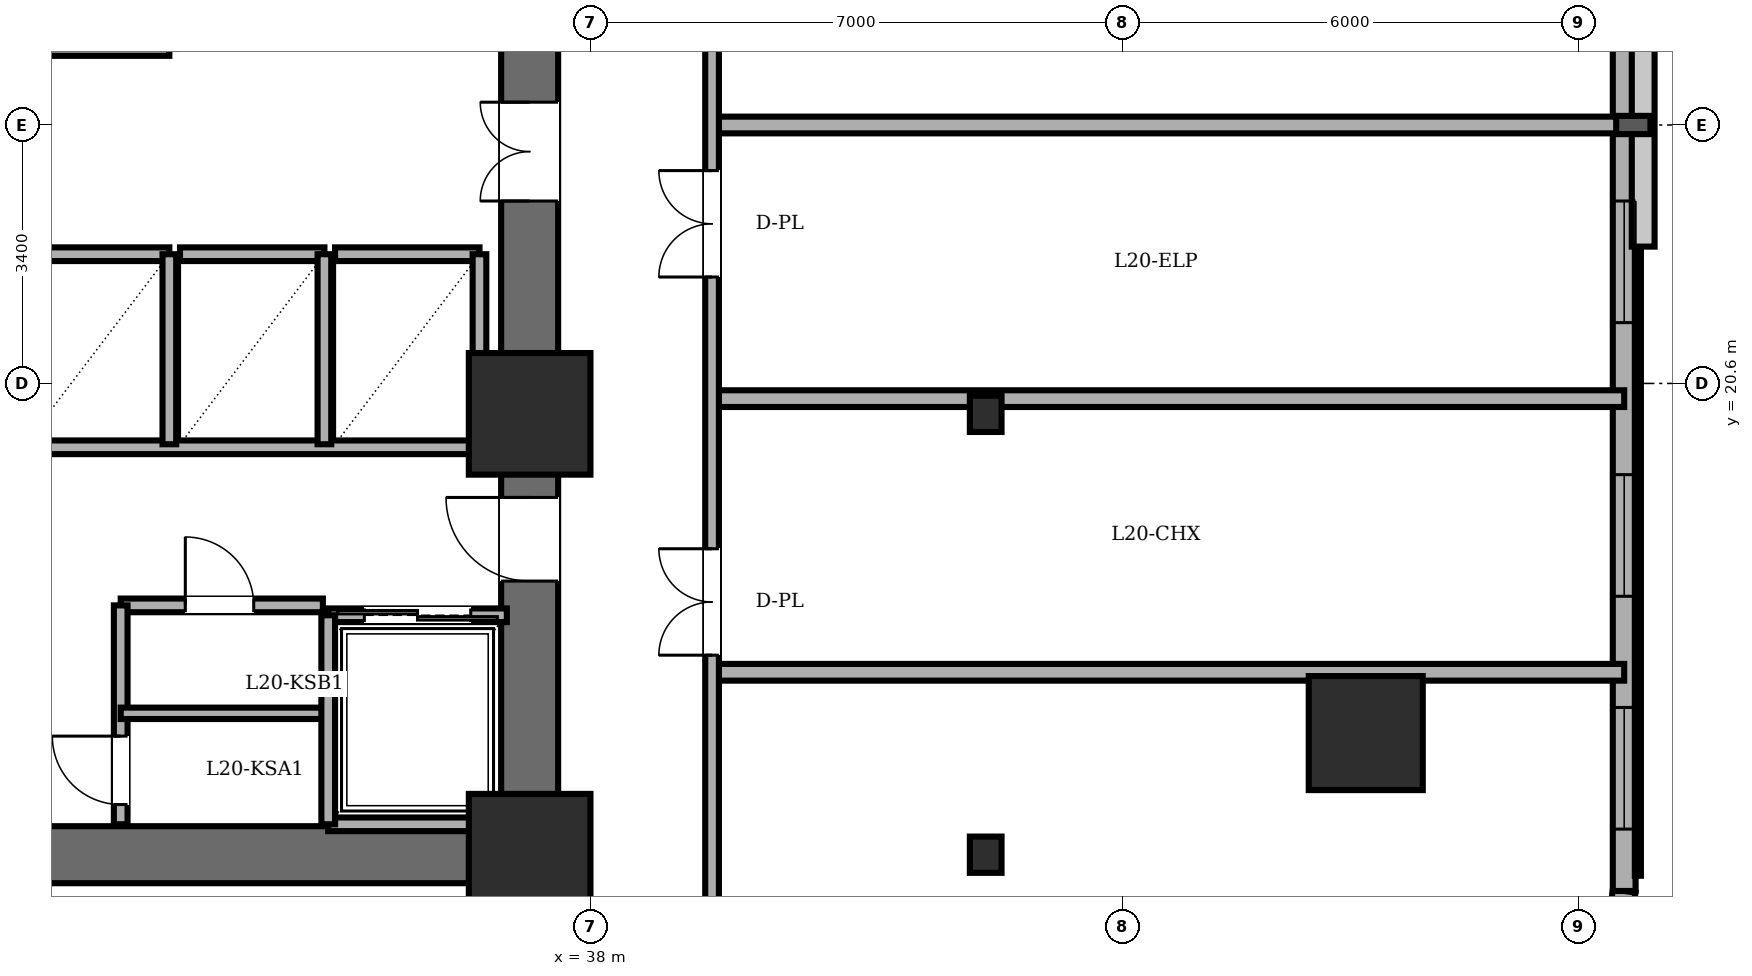
"""IFC4 building model, lengths in metres.
Left out: names, types, materials, properties, quantities, classifications, styles, units other than length and angle.
Written with IfcOpenShell. Run it as: python <this file> out.ifc"""

import sys

from ifc_helpers import new_model, si_unit, direction, frame, frame_2d, origin, origin_2d, place, context, subcontext, project, spatial, rectangle, circle, i_section, extrude, element, fill, save


model = new_model("IFC4")
c1 = context("Model", 3, precision=1e-05, world=origin(), true_north=direction((0.0, 1.0)))
c2 = subcontext(c1, "Body", "Model", "MODEL_VIEW")
j1 = project(units=[si_unit("LENGTHUNIT", "METRE"), si_unit("PLANEANGLEUNIT", "RADIAN")], contexts=[c1])
p1 = place(None, origin())
s1 = spatial("IfcSite", under=j1, at=p1, CompositionType="ELEMENT")
p2 = place(p1, origin())
s2 = spatial("IfcBuilding", under=s1, at=p2, CompositionType="ELEMENT")
p3 = place(p2, frame((0.0, 0.0, 75.6)))
s3 = spatial("IfcBuildingStorey", under=s2, at=p3, CompositionType="ELEMENT", Elevation=75.6)
for number, where, z_axis, x_axis in (
    (1, (37.2, 14.4, 0.0), (0.0, 0.0, 1.0), (1.0, 0.0, 0.0)),
    (2, (37.2, 20.2, 0.0), (0.0, 0.0, 1.0), (1.0, 0.0, 0.0)),
):
    element("IfcColumn", number, at=place(p3, frame(where, z_axis=z_axis, x_axis=x_axis)), inside=s3, PredefinedType="COLUMN", context=c2, shape_type="SweptSolid", body=[
        extrude(rectangle(XDim=1.6, YDim=1.6, at=origin_2d()), origin(), (0.0, 0.0, 1.0), 5.6),
    ])
p4 = place(p3, frame((48.2, 16.0, 0.0), z_axis=(0.0, 0.0, 1.0), x_axis=(1.0, 0.0, 0.0)))
e3 = element("IfcColumn", 3, at=p4, inside=s3, PredefinedType="COLUMN", context=c2, shape_type="SweptSolid", body=[
    extrude(circle(Radius=0.75, at=origin_2d()), origin(), (0.0, 0.0, 1.0), 2.96),
])
for number, where, z_axis, x_axis in (
    (4, (43.2, 14.4, 0.0), (0.0, 0.0, 1.0), (1.0, 0.0, 0.0)),
    (5, (43.2, 20.2, 0.0), (0.0, 0.0, 1.0), (1.0, 0.0, 0.0)),
):
    element("IfcColumn", number, at=place(p3, frame(where, z_axis=z_axis, x_axis=x_axis)), inside=s3, PredefinedType="COLUMN", context=c2, shape_type="SweptSolid", body=[
        extrude(i_section(OverallWidth=0.417, OverallDepth=0.477, WebThickness=0.036, FlangeThickness=0.057, FilletRadius=0.015, at=origin_2d()), origin(), (0.0, 0.0, 1.0), 2.96),
    ])
p5 = place(p3, frame((51.379, 12.363, 0.0), z_axis=(0.0, 0.0, 1.0), x_axis=(0.140380048512, 0.990097693149, 0.0)))
e6 = element("IfcWall", 6, at=p5, inside=s3, PredefinedType="SOLIDWALL", context=c2, shape_type="SweptSolid", body=[
    extrude(rectangle(XDim=1.576, YDim=0.3, at=frame_2d((0.788, 0.0))), origin(), (0.0, 0.0, 1.0), 5.36),
])
p6 = place(p3, frame((51.6, 13.923, 0.0), z_axis=(0.0, 0.0, 1.0), x_axis=(0.0, 1.0, 0.0)))
e7 = element("IfcWall", 7, at=p6, inside=s3, PredefinedType="SOLIDWALL", context=c2, shape_type="SweptSolid", body=[
    extrude(rectangle(XDim=20.154, YDim=0.3, at=frame_2d((10.077, 0.0))), origin(), (0.0, 0.0, 1.0), 5.36),
])
p7 = place(p6, frame((0.814, 0.0, 0.85)))
e8 = element("IfcOpeningElement", 8, at=p7, cuts=e7, PredefinedType="OPENING", context=c2, shape_type="SweptSolid", body=[
    extrude(rectangle(XDim=1.6, YDim=1.2, at=frame_2d((0.8, 0.6))), frame((0.0, 0.16, 0.0), z_axis=(0.0, -1.0, 0.0), x_axis=(1.0, 0.0, 0.0)), (0.0, 0.0, 1.0), 0.32),
])
p8 = place(p6, frame((3.877, 0.0, 0.85)))
e9 = element("IfcOpeningElement", 9, at=p8, cuts=e7, PredefinedType="OPENING", context=c2, shape_type="SweptSolid", body=[
    extrude(rectangle(XDim=1.6, YDim=1.2, at=frame_2d((0.8, 0.6))), frame((0.0, 0.16, 0.0), z_axis=(0.0, -1.0, 0.0), x_axis=(1.0, 0.0, 0.0)), (0.0, 0.0, 1.0), 0.32),
])
p9 = place(p6, frame((7.477, 0.0, 0.85)))
e10 = element("IfcOpeningElement", 10, at=p9, cuts=e7, PredefinedType="OPENING", context=c2, shape_type="SweptSolid", body=[
    extrude(rectangle(XDim=1.6, YDim=1.2, at=frame_2d((0.8, 0.6))), frame((0.0, 0.16, 0.0), z_axis=(0.0, -1.0, 0.0), x_axis=(1.0, 0.0, 0.0)), (0.0, 0.0, 1.0), 0.32),
])
p10 = place(p6, frame((12.51, 0.0, 0.85)))
e11 = element("IfcOpeningElement", 11, at=p10, cuts=e7, PredefinedType="OPENING", context=c2, shape_type="SweptSolid", body=[
    extrude(rectangle(XDim=1.6, YDim=1.2, at=frame_2d((0.8, 0.6))), frame((0.0, 0.16, 0.0), z_axis=(0.0, -1.0, 0.0), x_axis=(1.0, 0.0, 0.0)), (0.0, 0.0, 1.0), 0.32),
])
p11 = place(p6, frame((15.744, 0.0, 0.85)))
e12 = element("IfcOpeningElement", 12, at=p11, cuts=e7, PredefinedType="OPENING", context=c2, shape_type="SweptSolid", body=[
    extrude(rectangle(XDim=1.6, YDim=1.2, at=frame_2d((0.8, 0.6))), frame((0.0, 0.16, 0.0), z_axis=(0.0, -1.0, 0.0), x_axis=(1.0, 0.0, 0.0)), (0.0, 0.0, 1.0), 0.32),
])
p12 = place(p3, frame((37.2, 14.4, 0.0), z_axis=(0.0, 0.0, 1.0), x_axis=(-1.0, 0.0, 0.0)))
e13 = element("IfcWall", 13, at=p12, inside=s3, PredefinedType="SHEAR", context=c2, shape_type="SweptSolid", body=[
    extrude(rectangle(XDim=15.6, YDim=0.75, at=frame_2d((7.8, 0.0))), origin(), (0.0, 0.0, 1.0), 5.36),
])
p13 = place(p3, frame((37.2, 14.4, 0.0), z_axis=(0.0, 0.0, 1.0), x_axis=(0.0, 1.0, 0.0)))
e14 = element("IfcWall", 14, at=p13, inside=s3, PredefinedType="SHEAR", context=c2, shape_type="SweptSolid", body=[
    extrude(rectangle(XDim=19.2, YDim=0.75, at=frame_2d((9.6, 0.0))), origin(), (0.0, 0.0, 1.0), 5.36),
])
p14 = place(p13, frame((15.8, 0.0, 0.0)))
e15 = element("IfcOpeningElement", 15, at=p14, cuts=e14, PredefinedType="OPENING", context=c2, shape_type="SweptSolid", body=[
    extrude(rectangle(XDim=1.15, YDim=2.15, at=frame_2d((0.575, 1.075))), frame((0.0, 0.385, 0.0), z_axis=(0.0, -1.0, 0.0), x_axis=(1.0, 0.0, 0.0)), (0.0, 0.0, 1.0), 0.77),
])
p15 = place(p13, frame((3.6, 0.0, 0.0)))
e16 = element("IfcOpeningElement", 16, at=p15, cuts=e14, PredefinedType="OPENING", context=c2, shape_type="SweptSolid", body=[
    extrude(rectangle(XDim=1.1, YDim=2.15, at=frame_2d((0.55, 1.075))), frame((0.0, 0.385, 0.0), z_axis=(0.0, -1.0, 0.0), x_axis=(1.0, 0.0, 0.0)), (0.0, 0.0, 1.0), 0.77),
])
p16 = place(p13, frame((8.6, 0.0, 0.0)))
e17 = element("IfcOpeningElement", 17, at=p16, cuts=e14, PredefinedType="OPENING", context=c2, shape_type="SweptSolid", body=[
    extrude(rectangle(XDim=1.3, YDim=2.2, at=frame_2d((0.65, 1.1))), frame((0.0, 0.385, 0.0), z_axis=(0.0, -1.0, 0.0), x_axis=(1.0, 0.0, 0.0)), (0.0, 0.0, 1.0), 0.77),
])
p17 = place(p3, frame((21.95, 19.76, 0.0), z_axis=(0.0, 0.0, 1.0), x_axis=(1.0, 0.0, 0.0)))
e18 = element("IfcWall", 18, at=p17, inside=s3, PredefinedType="PARTITIONING", context=c2, shape_type="SweptSolid", body=[
    extrude(rectangle(XDim=14.87, YDim=0.18, at=frame_2d((7.435, 0.0))), origin(), (0.0, 0.0, 1.0), 5.36),
])
p18 = place(p3, frame((31.82, 17.68, 0.0), z_axis=(0.0, 0.0, 1.0), x_axis=(1.0, 0.0, 0.0)))
e19 = element("IfcWall", 19, at=p18, inside=s3, PredefinedType="PARTITIONING", context=c2, shape_type="SweptSolid", body=[
    extrude(rectangle(XDim=2.66, YDim=0.18, at=frame_2d((1.33, 0.0))), origin(), (0.0, 0.0, 1.0), 5.36),
])
p19 = place(p18, frame((0.85, 0.0, 0.0)))
e20 = element("IfcOpeningElement", 20, at=p19, cuts=e19, PredefinedType="OPENING", context=c2, shape_type="SweptSolid", body=[
    extrude(rectangle(XDim=0.9, YDim=2.05, at=frame_2d((0.45, 1.025))), frame((0.0, 0.1, 0.0), z_axis=(0.0, -1.0, 0.0), x_axis=(1.0, 0.0, 0.0)), (0.0, 0.0, 1.0), 0.2),
])
p20 = place(p3, frame((31.82, 14.8, 0.0), z_axis=(0.0, 0.0, 1.0), x_axis=(0.0, 1.0, 0.0)))
e21 = element("IfcWall", 21, at=p20, inside=s3, PredefinedType="PARTITIONING", context=c2, shape_type="SweptSolid", body=[
    extrude(rectangle(XDim=2.88, YDim=0.18, at=frame_2d((1.44, 0.0))), origin(), (0.0, 0.0, 1.0), 5.36),
])
p21 = place(p20, frame((0.26, 0.0, 0.0)))
e22 = element("IfcOpeningElement", 22, at=p21, cuts=e21, PredefinedType="OPENING", context=c2, shape_type="SweptSolid", body=[
    extrude(rectangle(XDim=0.9, YDim=2.05, at=frame_2d((0.45, 1.025))), frame((0.0, 0.1, 0.0), z_axis=(0.0, -1.0, 0.0), x_axis=(1.0, 0.0, 0.0)), (0.0, 0.0, 1.0), 0.2),
])
p22 = place(p3, frame((31.82, 16.26, 0.0), z_axis=(0.0, 0.0, 1.0), x_axis=(1.0, 0.0, 0.0)))
e23 = element("IfcWall", 23, at=p22, inside=s3, PredefinedType="PARTITIONING", context=c2, shape_type="SweptSolid", body=[
    extrude(rectangle(XDim=2.66, YDim=0.15, at=frame_2d((1.33, 0.0))), origin(), (0.0, 0.0, 1.0), 5.36),
])
p23 = place(p3, frame((34.55, 17.55, 0.0), z_axis=(0.0, 0.0, 1.0), x_axis=(1.0, 0.0, 0.0)))
e24 = element("IfcWall", 24, at=p23, inside=s3, PredefinedType="PARTITIONING", context=c2, shape_type="SweptSolid", body=[
    extrude(rectangle(XDim=2.35, YDim=0.18, at=frame_2d((1.175, 0.0))), origin(), (0.0, 0.0, 1.0), 5.36),
])
p24 = place(p23, frame((0.475, 0.0, 0.0)))
e25 = element("IfcOpeningElement", 25, at=p24, cuts=e24, PredefinedType="OPENING", context=c2, shape_type="SweptSolid", body=[
    extrude(rectangle(XDim=1.4, YDim=2.3, at=frame_2d((0.7, 1.15))), frame((0.0, 0.1, 0.0), z_axis=(0.0, -1.0, 0.0), x_axis=(1.0, 0.0, 0.0)), (0.0, 0.0, 1.0), 0.2),
])
p25 = place(p3, frame((36.9, 14.8, 0.0), z_axis=(0.0, 0.0, 1.0), x_axis=(-1.0, 0.0, 0.0)))
e26 = element("IfcWall", 26, at=p25, inside=s3, PredefinedType="PARTITIONING", context=c2, shape_type="SweptSolid", body=[
    extrude(rectangle(XDim=2.35, YDim=0.18, at=frame_2d((1.175, 0.0))), origin(), (0.0, 0.0, 1.0), 2.942),
])
p26 = place(p3, frame((34.55, 17.55, 0.0), z_axis=(0.0, 0.0, 1.0), x_axis=(0.0, -1.0, 0.0)))
e27 = element("IfcWall", 27, at=p26, inside=s3, PredefinedType="PARTITIONING", context=c2, shape_type="SweptSolid", body=[
    extrude(rectangle(XDim=2.75, YDim=0.18, at=frame_2d((1.375, 0.0))), origin(), (0.0, 0.0, 1.0), 5.36),
])
p27 = place(p3, frame((32.46, 25.0, 0.0), z_axis=(0.0, 0.0, 1.0), x_axis=(-1.0, 0.0, 0.0)))
e28 = element("IfcWall", 28, at=p27, inside=s3, PredefinedType="PARTITIONING", context=c2, shape_type="SweptSolid", body=[
    extrude(rectangle(XDim=1.82, YDim=0.18, at=frame_2d((0.91, 0.0))), origin(), (0.0, 0.0, 1.0), 5.36),
])
p28 = place(p3, frame((30.56, 22.3, 0.0), z_axis=(0.0, 0.0, 1.0), x_axis=(1.0, 0.0, 0.0)))
e29 = element("IfcWall", 29, at=p28, inside=s3, PredefinedType="PARTITIONING", context=c2, shape_type="SweptSolid", body=[
    extrude(rectangle(XDim=1.9, YDim=0.18, at=frame_2d((0.95, 0.0))), origin(), (0.0, 0.0, 1.0), 5.36),
])
p29 = place(p3, frame((32.46, 19.8, 0.0), z_axis=(0.0, 0.0, 1.0), x_axis=(0.0, 1.0, 0.0)))
e30 = element("IfcWall", 30, at=p29, inside=s3, PredefinedType="PARTITIONING", context=c2, shape_type="SweptSolid", body=[
    extrude(rectangle(XDim=2.5, YDim=0.18, at=frame_2d((1.25, 0.0))), origin(), (0.0, 0.0, 1.0), 5.36),
])
p30 = place(p3, frame((32.6, 22.3, 0.0), z_axis=(0.0, 0.0, 1.0), x_axis=(1.0, 0.0, 0.0)))
e31 = element("IfcWall", 31, at=p30, inside=s3, PredefinedType="PARTITIONING", context=c2, shape_type="SweptSolid", body=[
    extrude(rectangle(XDim=1.9, YDim=0.18, at=frame_2d((0.95, 0.0))), origin(), (0.0, 0.0, 1.0), 5.36),
])
p31 = place(p3, frame((34.5, 19.8, 0.0), z_axis=(0.0, 0.0, 1.0), x_axis=(0.0, 1.0, 0.0)))
e32 = element("IfcWall", 32, at=p31, inside=s3, PredefinedType="PARTITIONING", context=c2, shape_type="SweptSolid", body=[
    extrude(rectangle(XDim=2.5, YDim=0.18, at=frame_2d((1.25, 0.0))), origin(), (0.0, 0.0, 1.0), 5.36),
])
p32 = place(p3, frame((34.64, 22.3, 0.0), z_axis=(0.0, 0.0, 1.0), x_axis=(1.0, 0.0, 0.0)))
e33 = element("IfcWall", 33, at=p32, inside=s3, PredefinedType="PARTITIONING", context=c2, shape_type="SweptSolid", body=[
    extrude(rectangle(XDim=1.9, YDim=0.18, at=frame_2d((0.95, 0.0))), origin(), (0.0, 0.0, 1.0), 5.36),
])
p33 = place(p3, frame((36.54, 19.8, 0.0), z_axis=(0.0, 0.0, 1.0), x_axis=(0.0, 1.0, 0.0)))
e34 = element("IfcWall", 34, at=p33, inside=s3, PredefinedType="PARTITIONING", context=c2, shape_type="SweptSolid", body=[
    extrude(rectangle(XDim=2.5, YDim=0.18, at=frame_2d((1.25, 0.0))), origin(), (0.0, 0.0, 1.0), 5.36),
])
p34 = place(p3, frame((39.6, 16.8, 0.0), z_axis=(0.0, 0.0, 1.0), x_axis=(1.0, 0.0, 0.0)))
e35 = element("IfcWall", 35, at=p34, inside=s3, PredefinedType="PARTITIONING", context=c2, shape_type="SweptSolid", body=[
    extrude(rectangle(XDim=12.0, YDim=0.22, at=frame_2d((6.0, 0.0))), origin(), (0.0, 0.0, 1.0), 5.36),
])
p35 = place(p3, frame((39.6, 20.4, 0.0), z_axis=(0.0, 0.0, 1.0), x_axis=(1.0, 0.0, 0.0)))
e36 = element("IfcWall", 36, at=p35, inside=s3, PredefinedType="PARTITIONING", context=c2, shape_type="SweptSolid", body=[
    extrude(rectangle(XDim=12.0, YDim=0.22, at=frame_2d((6.0, 0.0))), origin(), (0.0, 0.0, 1.0), 2.942),
])
p36 = place(p3, frame((39.6, 24.0, 0.0), z_axis=(0.0, 0.0, 1.0), x_axis=(1.0, 0.0, 0.0)))
e37 = element("IfcWall", 37, at=p36, inside=s3, PredefinedType="PARTITIONING", context=c2, shape_type="SweptSolid", body=[
    extrude(rectangle(XDim=12.0, YDim=0.22, at=frame_2d((6.0, 0.0))), origin(), (0.0, 0.0, 1.0), 4.982),
])
p37 = place(p3, frame((39.6, 11.8, 0.0), z_axis=(0.0, 0.0, 1.0), x_axis=(0.0, 1.0, 0.0)))
e38 = element("IfcWall", 38, at=p37, inside=s3, PredefinedType="PARTITIONING", context=c2, shape_type="SweptSolid", body=[
    extrude(rectangle(XDim=24.4, YDim=0.18, at=frame_2d((12.2, 0.0))), origin(), (0.0, 0.0, 1.0), 5.36),
])
p38 = place(p37, frame((18.07, 0.0, 0.0)))
e39 = element("IfcOpeningElement", 39, at=p38, cuts=e38, PredefinedType="OPENING", context=c2, shape_type="SweptSolid", body=[
    extrude(rectangle(XDim=1.4, YDim=2.25, at=frame_2d((0.7, 1.125))), frame((0.0, 0.1, 0.0), z_axis=(0.0, -1.0, 0.0), x_axis=(1.0, 0.0, 0.0)), (0.0, 0.0, 1.0), 0.2),
])
p39 = place(p37, frame((5.225, 0.0, 0.0)))
e40 = element("IfcOpeningElement", 40, at=p39, cuts=e38, PredefinedType="OPENING", context=c2, shape_type="SweptSolid", body=[
    extrude(rectangle(XDim=1.4, YDim=2.25, at=frame_2d((0.7, 1.125))), frame((0.0, 0.1, 0.0), z_axis=(0.0, -1.0, 0.0), x_axis=(1.0, 0.0, 0.0)), (0.0, 0.0, 1.0), 0.2),
])
p40 = place(p37, frame((10.2, 0.0, 0.0)))
e41 = element("IfcOpeningElement", 41, at=p40, cuts=e38, PredefinedType="OPENING", context=c2, shape_type="SweptSolid", body=[
    extrude(rectangle(XDim=1.4, YDim=2.25, at=frame_2d((0.7, 1.125))), frame((0.0, 0.1, 0.0), z_axis=(0.0, -1.0, 0.0), x_axis=(1.0, 0.0, 0.0)), (0.0, 0.0, 1.0), 0.2),
])
p41 = place(p7, origin())
e42 = element("IfcWindow", 42, at=p41, inside=s3, PartitioningType="DOUBLE_PANEL_VERTICAL", PredefinedType="WINDOW", context=c2, shape_type="SweptSolid", body=[
    extrude(rectangle(XDim=1.6, YDim=1.2, at=frame_2d((0.8, 0.6))), frame((0.0, 0.03, 0.0), z_axis=(0.0, -1.0, 0.0), x_axis=(1.0, 0.0, 0.0)), (0.0, 0.0, 1.0), 0.06),
])
fill(e8, e42)
p42 = place(p8, origin())
e43 = element("IfcWindow", 43, at=p42, inside=s3, PartitioningType="DOUBLE_PANEL_VERTICAL", PredefinedType="WINDOW", context=c2, shape_type="SweptSolid", body=[
    extrude(rectangle(XDim=1.6, YDim=1.2, at=frame_2d((0.8, 0.6))), frame((0.0, 0.03, 0.0), z_axis=(0.0, -1.0, 0.0), x_axis=(1.0, 0.0, 0.0)), (0.0, 0.0, 1.0), 0.06),
])
fill(e9, e43)
p43 = place(p9, origin())
e44 = element("IfcWindow", 44, at=p43, inside=s3, PartitioningType="DOUBLE_PANEL_VERTICAL", PredefinedType="WINDOW", context=c2, shape_type="SweptSolid", body=[
    extrude(rectangle(XDim=1.6, YDim=1.2, at=frame_2d((0.8, 0.6))), frame((0.0, 0.03, 0.0), z_axis=(0.0, -1.0, 0.0), x_axis=(1.0, 0.0, 0.0)), (0.0, 0.0, 1.0), 0.06),
])
fill(e10, e44)
p44 = place(p15, origin())
e45 = element("IfcDoor", 45, at=p44, inside=s3, OperationType="SINGLE_SWING_RIGHT", PredefinedType="DOOR", context=c2, shape_type="SweptSolid", body=[
    extrude(rectangle(XDim=1.1, YDim=2.15, at=frame_2d((0.55, 1.075))), frame((0.0, 0.025, 0.0), z_axis=(0.0, -1.0, 0.0), x_axis=(1.0, 0.0, 0.0)), (0.0, 0.0, 1.0), 0.05),
])
fill(e16, e45)
p45 = place(p19, origin())
e46 = element("IfcDoor", 46, at=p45, inside=s3, OperationType="SINGLE_SWING_LEFT", PredefinedType="DOOR", context=c2, shape_type="SweptSolid", body=[
    extrude(rectangle(XDim=0.9, YDim=2.05, at=frame_2d((0.45, 1.025))), frame((0.0, 0.025, 0.0), z_axis=(0.0, -1.0, 0.0), x_axis=(1.0, 0.0, 0.0)), (0.0, 0.0, 1.0), 0.05),
])
fill(e20, e46)
p46 = place(p21, origin())
e47 = element("IfcDoor", 47, at=p46, inside=s3, OperationType="SINGLE_SWING_RIGHT", PredefinedType="DOOR", context=c2, shape_type="SweptSolid", body=[
    extrude(rectangle(XDim=0.9, YDim=2.05, at=frame_2d((0.45, 1.025))), frame((0.0, 0.025, 0.0), z_axis=(0.0, -1.0, 0.0), x_axis=(1.0, 0.0, 0.0)), (0.0, 0.0, 1.0), 0.05),
])
fill(e22, e47)
p47 = place(p24, origin())
e48 = element("IfcDoor", 48, at=p47, inside=s3, OperationType="DOUBLE_DOOR_SLIDING", PredefinedType="DOOR", context=c2, shape_type="SweptSolid", body=[
    extrude(rectangle(XDim=1.4, YDim=2.3, at=frame_2d((0.7, 1.15))), frame((0.0, 0.025, 0.0), z_axis=(0.0, -1.0, 0.0), x_axis=(1.0, 0.0, 0.0)), (0.0, 0.0, 1.0), 0.05),
])
fill(e25, e48)
p48 = place(p16, origin())
e49 = element("IfcDoor", 49, at=p48, inside=s3, OperationType="DOUBLE_DOOR_SINGLE_SWING", PredefinedType="DOOR", context=c2, shape_type="SweptSolid", body=[
    extrude(rectangle(XDim=1.3, YDim=2.2, at=frame_2d((0.65, 1.1))), frame((0.0, 0.025, 0.0), z_axis=(0.0, -1.0, 0.0), x_axis=(1.0, 0.0, 0.0)), (0.0, 0.0, 1.0), 0.05),
])
fill(e17, e49)
p49 = place(p39, origin())
e50 = element("IfcDoor", 50, at=p49, inside=s3, OperationType="DOUBLE_DOOR_SINGLE_SWING", PredefinedType="DOOR", context=c2, shape_type="SweptSolid", body=[
    extrude(rectangle(XDim=1.4, YDim=2.25, at=frame_2d((0.7, 1.125))), frame((0.0, 0.025, 0.0), z_axis=(0.0, -1.0, 0.0), x_axis=(1.0, 0.0, 0.0)), (0.0, 0.0, 1.0), 0.05),
])
fill(e40, e50)
p50 = place(p40, origin())
e51 = element("IfcDoor", 51, at=p50, inside=s3, OperationType="DOUBLE_DOOR_SINGLE_SWING", PredefinedType="DOOR", context=c2, shape_type="SweptSolid", body=[
    extrude(rectangle(XDim=1.4, YDim=2.25, at=frame_2d((0.7, 1.125))), frame((0.0, 0.025, 0.0), z_axis=(0.0, -1.0, 0.0), x_axis=(1.0, 0.0, 0.0)), (0.0, 0.0, 1.0), 0.05),
])
fill(e41, e51)
save(model, sys.argv[1])
